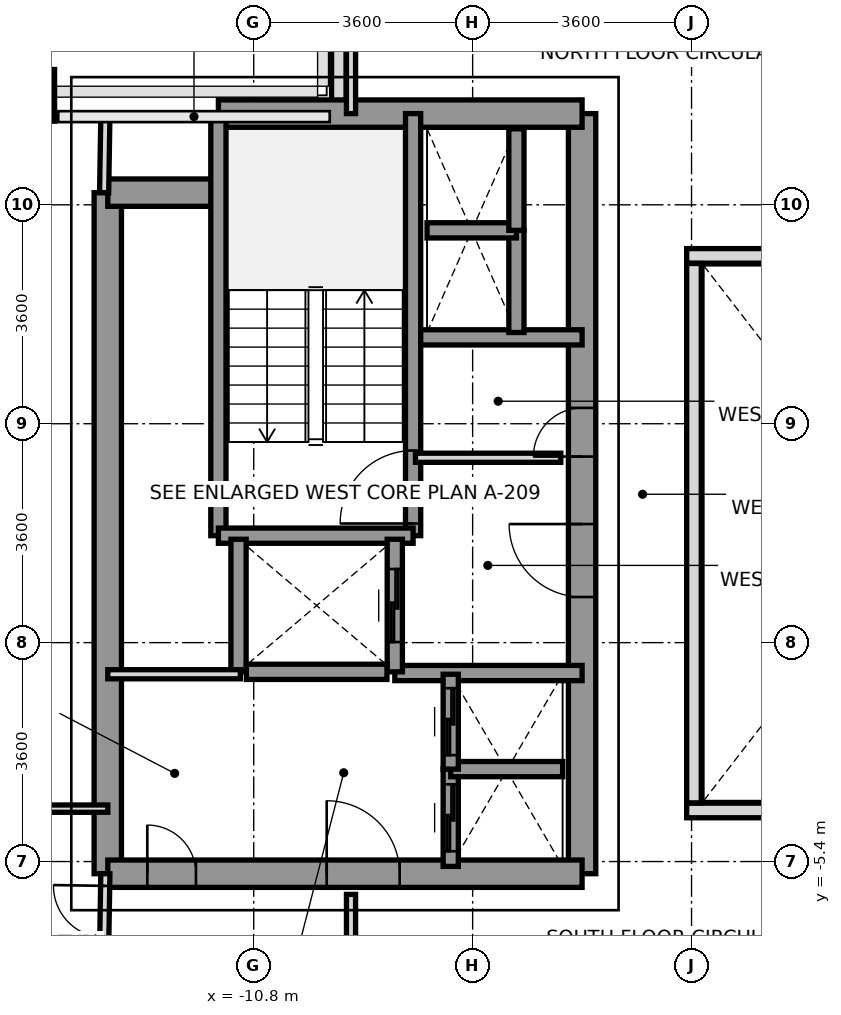
"""IFC4 building model, lengths in metres.
Left out: names, types, materials, properties, quantities, classifications, styles, units other than length and angle.
Written with IfcOpenShell. Run it as: python <this file> out.ifc"""

import sys

from ifc_helpers import new_model, si_unit, direction, frame, frame_2d, origin, origin_2d, place, context, subcontext, project, spatial, rectangle, extrude, source, transform, mapped, element, fill, save


model = new_model("IFC4")
c1 = context("Model", 3, precision=1e-05, world=origin(), true_north=direction((0.0, 1.0)))
c2 = subcontext(c1, "Body", "Model", "MODEL_VIEW")
j1 = project(units=[si_unit("LENGTHUNIT", "METRE"), si_unit("PLANEANGLEUNIT", "RADIAN")], contexts=[c1])
p1 = place(None, origin())
s1 = spatial("IfcSite", under=j1, at=p1, CompositionType="ELEMENT")
p2 = place(p1, origin())
s2 = spatial("IfcBuilding", under=s1, at=p2, CompositionType="ELEMENT")
p3 = place(p2, frame((0.0, 0.0, 100.6)))
s3 = spatial("IfcBuildingStorey", under=s2, at=p3, CompositionType="ELEMENT", Elevation=100.6)
m1 = source(origin(), c2, "Body", "SweptSolid", [
    extrude(rectangle(XDim=0.65, YDim=0.85, at=origin_2d()), origin(), (0.0, 0.0, 1.0), 3.2),
])
p4 = place(p3, frame((-14.4, 7.2, 0.0), z_axis=(0.0, 0.0, 1.0), x_axis=(1.0, 0.0, 0.0)))
e1 = element("IfcColumn", 1, at=p4, inside=s3, PredefinedType="COLUMN", context=c2, shape_type="MappedRepresentation", body=[
    mapped(m1, transform((0.0, 0.0, 0.0), x_axis=(1.0, 0.0, 0.0), y_axis=(0.0, 1.0, 0.0), z_axis=(0.0, 0.0, 1.0), scale=1.0)),
])
p5 = place(p3, frame((-9.4, 6.953, 0.0), z_axis=(0.0, 0.0, 1.0), x_axis=(0.0, 1.0, 0.0)))
e2 = element("IfcWall", 2, at=p5, inside=s3, PredefinedType="PARAPET", context=c2, shape_type="SweptSolid", body=[
    extrude(rectangle(XDim=1.519, YDim=0.24, at=frame_2d((0.76, 0.0))), origin(), (0.0, 0.0, 1.0), 1.15),
])
p6 = place(p3, frame((-13.2, -5.6, 0.0), z_axis=(0.0, 0.0, 1.0), x_axis=(0.0, 1.0, 0.0)))
e3 = element("IfcWall", 3, at=p6, inside=s3, PredefinedType="SHEAR", context=c2, shape_type="SweptSolid", body=[
    extrude(rectangle(XDim=11.2, YDim=0.45, at=frame_2d((5.6, 0.0))), origin(), (0.0, 0.0, 1.0), 3.2),
])
p7 = place(p3, frame((-5.4, -5.6, 0.0), z_axis=(0.0, 0.0, 1.0), x_axis=(0.0, 1.0, 0.0)))
e4 = element("IfcWall", 4, at=p7, inside=s3, PredefinedType="SHEAR", context=c2, shape_type="SweptSolid", body=[
    extrude(rectangle(XDim=12.5, YDim=0.45, at=frame_2d((6.25, 0.0))), origin(), (0.0, 0.0, 1.0), 3.2),
])
p8 = place(p7, frame((4.55, 0.0, 0.0)))
e5 = element("IfcOpeningElement", 5, at=p8, cuts=e4, PredefinedType="OPENING", context=c2, shape_type="SweptSolid", body=[
    extrude(rectangle(XDim=1.2, YDim=2.2, at=frame_2d((0.6, 1.1))), frame((0.0, 0.235, 0.0), z_axis=(0.0, -1.0, 0.0), x_axis=(1.0, 0.0, 0.0)), (0.0, 0.0, 1.0), 0.47),
])
p9 = place(p7, frame((6.86, 0.0, 0.0)))
e6 = element("IfcOpeningElement", 6, at=p9, cuts=e4, PredefinedType="OPENING", context=c2, shape_type="SweptSolid", body=[
    extrude(rectangle(XDim=0.8, YDim=2.1, at=frame_2d((0.4, 1.05))), frame((0.0, 0.235, 0.0), z_axis=(0.0, -1.0, 0.0), x_axis=(1.0, 0.0, 0.0)), (0.0, 0.0, 1.0), 0.47),
])
p10 = place(p3, frame((-11.381, 6.9, 0.0), z_axis=(0.0, 0.0, 1.0), x_axis=(1.0, 0.0, 0.0)))
e7 = element("IfcWall", 7, at=p10, inside=s3, PredefinedType="SHEAR", context=c2, shape_type="SweptSolid", body=[
    extrude(rectangle(XDim=5.981, YDim=0.45, at=frame_2d((2.991, 0.0))), origin(), (0.0, 0.0, 1.0), 3.2),
])
p11 = place(p3, frame((-13.2, 5.6, 0.0), z_axis=(0.0, 0.0, 1.0), x_axis=(1.0, 0.0, 0.0)))
e8 = element("IfcWall", 8, at=p11, inside=s3, PredefinedType="SHEAR", context=c2, shape_type="SweptSolid", body=[
    extrude(rectangle(XDim=1.819, YDim=0.45, at=frame_2d((0.909, 0.0))), origin(), (0.0, 0.0, 1.0), 3.2),
])
p12 = place(p3, frame((-13.2, -5.6, 0.0), z_axis=(0.0, 0.0, 1.0), x_axis=(1.0, 0.0, 0.0)))
e9 = element("IfcWall", 9, at=p12, inside=s3, PredefinedType="SHEAR", context=c2, shape_type="SweptSolid", body=[
    extrude(rectangle(XDim=7.8, YDim=0.45, at=frame_2d((3.9, 0.0))), origin(), (0.0, 0.0, 1.0), 3.2),
])
p13 = place(p12, frame((3.6, 0.0, 0.0)))
e10 = element("IfcOpeningElement", 10, at=p13, cuts=e9, PredefinedType="OPENING", context=c2, shape_type="SweptSolid", body=[
    extrude(rectangle(XDim=1.2, YDim=2.2, at=frame_2d((0.6, 1.1))), frame((0.0, 0.235, 0.0), z_axis=(0.0, -1.0, 0.0), x_axis=(1.0, 0.0, 0.0)), (0.0, 0.0, 1.0), 0.47),
])
p14 = place(p12, frame((0.65, 0.0, 0.0)))
e11 = element("IfcOpeningElement", 11, at=p14, cuts=e9, PredefinedType="OPENING", context=c2, shape_type="SweptSolid", body=[
    extrude(rectangle(XDim=0.8, YDim=2.1, at=frame_2d((0.4, 1.05))), frame((0.0, 0.235, 0.0), z_axis=(0.0, -1.0, 0.0), x_axis=(1.0, 0.0, 0.0)), (0.0, 0.0, 1.0), 0.47),
])
p15 = place(p3, frame((-8.18, 3.22, 0.0), z_axis=(0.0, 0.0, 1.0), x_axis=(1.0, 0.0, 0.0)))
e12 = element("IfcWall", 12, at=p15, inside=s3, PredefinedType="SOLIDWALL", context=c2, shape_type="SweptSolid", body=[
    extrude(rectangle(XDim=2.78, YDim=0.25, at=frame_2d((1.39, 0.0))), origin(), (0.0, 0.0, 1.0), 3.2),
])
p16 = place(p3, frame((-8.48, -2.3, 0.0), z_axis=(0.0, 0.0, 1.0), x_axis=(1.0, 0.0, 0.0)))
e13 = element("IfcWall", 13, at=p16, inside=s3, PredefinedType="SOLIDWALL", context=c2, shape_type="SweptSolid", body=[
    extrude(rectangle(XDim=3.08, YDim=0.25, at=frame_2d((1.54, 0.0))), origin(), (0.0, 0.0, 1.0), 3.2),
])
p17 = place(p3, frame((-8.179, -0.041, 0.0), z_axis=(0.0, 0.0, 1.0), x_axis=(0.0, 1.0, 0.0)))
e14 = element("IfcWall", 14, at=p17, inside=s3, PredefinedType="SOLIDWALL", context=c2, shape_type="SweptSolid", body=[
    extrude(rectangle(XDim=6.941, YDim=0.25, at=frame_2d((3.47, 0.0))), origin(), (0.0, 0.0, 1.0), 3.2),
])
p18 = place(p17, frame((0.2, 0.0, 0.0)))
e15 = element("IfcOpeningElement", 15, at=p18, cuts=e14, PredefinedType="OPENING", context=c2, shape_type="SweptSolid", body=[
    extrude(rectangle(XDim=1.2, YDim=2.2, at=frame_2d((0.6, 1.1))), frame((0.0, 0.135, 0.0), z_axis=(0.0, -1.0, 0.0), x_axis=(1.0, 0.0, 0.0)), (0.0, 0.0, 1.0), 0.27),
])
p19 = place(p3, frame((-11.381, -0.041, 0.0), z_axis=(0.0, 0.0, 1.0), x_axis=(0.0, 1.0, 0.0)))
e16 = element("IfcWall", 16, at=p19, inside=s3, PredefinedType="SOLIDWALL", context=c2, shape_type="SweptSolid", body=[
    extrude(rectangle(XDim=6.941, YDim=0.25, at=frame_2d((3.47, 0.0))), origin(), (0.0, 0.0, 1.0), 3.2),
])
p20 = place(p3, frame((-11.381, -0.041, 0.0), z_axis=(0.0, 0.0, 1.0), x_axis=(1.0, 0.0, 0.0)))
e17 = element("IfcWall", 17, at=p20, inside=s3, PredefinedType="SOLIDWALL", context=c2, shape_type="SweptSolid", body=[
    extrude(rectangle(XDim=3.202, YDim=0.25, at=frame_2d((1.601, 0.0))), origin(), (0.0, 0.0, 1.0), 3.2),
])
p21 = place(p3, frame((-11.05, -2.28, 0.0), z_axis=(0.0, 0.0, 1.0), x_axis=(0.0, 1.0, 0.0)))
e18 = element("IfcWall", 18, at=p21, inside=s3, PredefinedType="SOLIDWALL", context=c2, shape_type="SweptSolid", body=[
    extrude(rectangle(XDim=2.18, YDim=0.25, at=frame_2d((1.09, 0.0))), origin(), (0.0, 0.0, 1.0), 3.2),
])
p22 = place(p3, frame((-8.48, -2.28, 0.0), z_axis=(0.0, 0.0, 1.0), x_axis=(0.0, 1.0, 0.0)))
e19 = element("IfcWall", 19, at=p22, inside=s3, PredefinedType="SOLIDWALL", context=c2, shape_type="SweptSolid", body=[
    extrude(rectangle(XDim=2.18, YDim=0.25, at=frame_2d((1.09, 0.0))), origin(), (0.0, 0.0, 1.0), 3.2),
])
p23 = place(p22, frame((0.49, 0.0, 0.0)))
e20 = element("IfcOpeningElement", 20, at=p23, cuts=e19, PredefinedType="OPENING", context=c2, shape_type="SweptSolid", body=[
    extrude(rectangle(XDim=1.2, YDim=2.2, at=frame_2d((0.6, 1.1))), frame((0.0, 0.135, 0.0), z_axis=(0.0, -1.0, 0.0), x_axis=(1.0, 0.0, 0.0)), (0.0, 0.0, 1.0), 0.27),
])
p24 = place(p3, frame((-10.921, -2.28, 0.0), z_axis=(0.0, 0.0, 1.0), x_axis=(1.0, 0.0, 0.0)))
e21 = element("IfcWall", 21, at=p24, inside=s3, PredefinedType="SOLIDWALL", context=c2, shape_type="SweptSolid", body=[
    extrude(rectangle(XDim=2.312, YDim=0.25, at=frame_2d((1.156, 0.0))), origin(), (0.0, 0.0, 1.0), 3.2),
])
p25 = place(p3, frame((-7.56, -5.48, 0.0), z_axis=(0.0, 0.0, 1.0), x_axis=(0.0, 1.0, 0.0)))
e22 = element("IfcWall", 22, at=p25, inside=s3, PredefinedType="SOLIDWALL", context=c2, shape_type="SweptSolid", body=[
    extrude(rectangle(XDim=1.6, YDim=0.25, at=frame_2d((0.8, 0.0))), origin(), (0.0, 0.0, 1.0), 3.2),
])
p26 = place(p25, frame((0.25, 0.0, 0.0)))
e23 = element("IfcOpeningElement", 23, at=p26, cuts=e22, PredefinedType="OPENING", context=c2, shape_type="SweptSolid", body=[
    extrude(rectangle(XDim=1.1, YDim=2.2, at=frame_2d((0.55, 1.1))), frame((0.0, 0.135, 0.0), z_axis=(0.0, -1.0, 0.0), x_axis=(1.0, 0.0, 0.0)), (0.0, 0.0, 1.0), 0.27),
])
p27 = place(p3, frame((-7.56, -3.88, 0.0), z_axis=(0.0, 0.0, 1.0), x_axis=(1.0, 0.0, 0.0)))
e24 = element("IfcWall", 24, at=p27, inside=s3, PredefinedType="SOLIDWALL", context=c2, shape_type="SweptSolid", body=[
    extrude(rectangle(XDim=1.84, YDim=0.25, at=frame_2d((0.92, 0.0))), origin(), (0.0, 0.0, 1.0), 3.2),
])
p28 = place(p3, frame((-7.56, -3.88, 0.0), z_axis=(0.0, 0.0, 1.0), x_axis=(0.0, 1.0, 0.0)))
e25 = element("IfcWall", 25, at=p28, inside=s3, PredefinedType="SOLIDWALL", context=c2, shape_type="SweptSolid", body=[
    extrude(rectangle(XDim=1.56, YDim=0.25, at=frame_2d((0.78, 0.0))), origin(), (0.0, 0.0, 1.0), 3.2),
])
p29 = place(p28, frame((0.23, 0.0, 0.0)))
e26 = element("IfcOpeningElement", 26, at=p29, cuts=e25, PredefinedType="OPENING", context=c2, shape_type="SweptSolid", body=[
    extrude(rectangle(XDim=1.1, YDim=2.2, at=frame_2d((0.55, 1.1))), frame((0.0, 0.135, 0.0), z_axis=(0.0, -1.0, 0.0), x_axis=(1.0, 0.0, 0.0)), (0.0, 0.0, 1.0), 0.27),
])
p30 = place(p3, frame((-6.48, 3.3, 0.0), z_axis=(0.0, 0.0, 1.0), x_axis=(0.0, 1.0, 0.0)))
e27 = element("IfcWall", 27, at=p30, inside=s3, PredefinedType="SOLIDWALL", context=c2, shape_type="SweptSolid", body=[
    extrude(rectangle(XDim=1.68, YDim=0.25, at=frame_2d((0.84, 0.0))), origin(), (0.0, 0.0, 1.0), 3.2),
])
p31 = place(p3, frame((-7.95, 4.98, 0.0), z_axis=(0.0, 0.0, 1.0), x_axis=(1.0, 0.0, 0.0)))
e28 = element("IfcWall", 28, at=p31, inside=s3, PredefinedType="SOLIDWALL", context=c2, shape_type="SweptSolid", body=[
    extrude(rectangle(XDim=1.47, YDim=0.25, at=frame_2d((0.735, 0.0))), origin(), (0.0, 0.0, 1.0), 3.2),
])
p32 = place(p3, frame((-6.48, 4.98, 0.0), z_axis=(0.0, 0.0, 1.0), x_axis=(0.0, 1.0, 0.0)))
e29 = element("IfcWall", 29, at=p32, inside=s3, PredefinedType="SOLIDWALL", context=c2, shape_type="SweptSolid", body=[
    extrude(rectangle(XDim=1.67, YDim=0.25, at=frame_2d((0.835, 0.0))), origin(), (0.0, 0.0, 1.0), 3.2),
])
p33 = place(p3, frame((-8.14, 1.24, 0.0), z_axis=(0.0, 0.0, 1.0), x_axis=(1.0, 0.0, 0.0)))
e30 = element("IfcWall", 30, at=p33, inside=s3, PredefinedType="PARTITIONING", context=c2, shape_type="SweptSolid", body=[
    extrude(rectangle(XDim=2.39, YDim=0.15, at=frame_2d((1.195, 0.0))), origin(), (0.0, 0.0, 1.0), 2.3),
])
p34 = place(p3, frame((-13.2, -2.32, 0.0), z_axis=(0.0, 0.0, 1.0), x_axis=(1.0, 0.0, 0.0)))
e31 = element("IfcWall", 31, at=p34, inside=s3, PredefinedType="PARTITIONING", context=c2, shape_type="SweptSolid", body=[
    extrude(rectangle(XDim=2.18, YDim=0.15, at=frame_2d((1.09, 0.0))), origin(), (0.0, 0.0, 1.0), 3.2),
])
p35 = place(p3, frame((-9.2, 6.9, 0.0), z_axis=(0.0, 0.0, 1.0), x_axis=(0.0, 1.0, 0.0)))
e32 = element("IfcWall", 32, at=p35, inside=s3, PredefinedType="PARTITIONING", context=c2, shape_type="SweptSolid", body=[
    extrude(rectangle(XDim=8.78, YDim=0.15, at=frame_2d((4.39, 0.0))), origin(), (0.0, 0.0, 1.0), 2.7),
])
p36 = place(p3, frame((-9.2, -15.68, 0.0), z_axis=(0.0, 0.0, 1.0), x_axis=(0.0, 1.0, 0.0)))
e33 = element("IfcWall", 33, at=p36, inside=s3, PredefinedType="PARTITIONING", context=c2, shape_type="SweptSolid", body=[
    extrude(rectangle(XDim=9.74, YDim=0.15, at=frame_2d((4.87, 0.0))), origin(), (0.0, 0.0, 1.0), 2.7),
])
p37 = place(p3, frame((-13.26, 5.6, 0.0), z_axis=(0.0, 0.0, 1.0), x_axis=(0.016013571389, 0.999871774545, 0.0)))
e34 = element("IfcWall", 34, at=p37, inside=s3, PredefinedType="PARTITIONING", context=c2, shape_type="SweptSolid", body=[
    extrude(rectangle(XDim=1.25, YDim=0.15, at=frame_2d((0.625, 0.0))), origin(), (0.0, 0.0, 1.0), 3.2),
])
p38 = place(p3, frame((-13.26, -6.85, 0.0), z_axis=(0.0, 0.0, 1.0), x_axis=(0.016013571389, 0.999871774545, 0.0)))
e35 = element("IfcWall", 35, at=p38, inside=s3, PredefinedType="PARTITIONING", context=c2, shape_type="SweptSolid", body=[
    extrude(rectangle(XDim=1.25, YDim=0.15, at=frame_2d((0.625, 0.0))), origin(), (0.0, 0.0, 1.0), 3.2),
])
p39 = place(p38, frame((0.2, 0.0, 0.0)))
e36 = element("IfcOpeningElement", 36, at=p39, cuts=e35, PredefinedType="OPENING", context=c2, shape_type="SweptSolid", body=[
    extrude(rectangle(XDim=0.85, YDim=2.1, at=frame_2d((0.425, 1.05))), frame((0.0, 0.085, 0.0), z_axis=(0.0, -1.0, 0.0), x_axis=(1.0, 0.0, 0.0)), (0.0, 0.0, 1.0), 0.17),
])
p40 = place(p3, frame((-23.3, -4.53, 0.0), z_axis=(0.0, 0.0, 1.0), x_axis=(1.0, 0.0, 0.0)))
e37 = element("IfcWall", 37, at=p40, inside=s3, PredefinedType="PARTITIONING", context=c2, shape_type="SweptSolid", body=[
    extrude(rectangle(XDim=10.1, YDim=0.12, at=frame_2d((5.05, 0.0))), origin(), (0.0, 0.0, 1.0), 2.75),
])
p41 = place(p40, frame((2.1, 0.0, 0.0)))
e38 = element("IfcOpeningElement", 38, at=p41, cuts=e37, PredefinedType="OPENING", context=c2, shape_type="SweptSolid", body=[
    extrude(rectangle(XDim=0.95, YDim=2.15, at=frame_2d((0.475, 1.075))), frame((0.0, 0.07, 0.0), z_axis=(0.0, -1.0, 0.0), x_axis=(1.0, 0.0, 0.0)), (0.0, 0.0, 1.0), 0.14),
])
for number, where, z_axis, x_axis in (
    (39, (-3.68, -4.56, 0.0), (0.0, 0.0, 1.0), (1.0, 0.0, 0.0)),
    (40, (-3.68, 4.56, 0.0), (0.0, 0.0, 1.0), (1.0, 0.0, 0.0)),
):
    element("IfcWall", number, at=place(p3, frame(where, z_axis=z_axis, x_axis=x_axis)), inside=s3, PredefinedType="PARAPET", context=c2, shape_type="SweptSolid", body=[
        extrude(rectangle(XDim=7.36, YDim=0.24, at=frame_2d((3.68, 0.0))), origin(), (0.0, 0.0, 1.0), 1.15),
    ])
p42 = place(p3, frame((-3.56, -4.435, 0.0), z_axis=(0.0, 0.0, 1.0), x_axis=(0.0, 1.0, 0.0)))
e41 = element("IfcWall", 41, at=p42, inside=s3, PredefinedType="PARAPET", context=c2, shape_type="SweptSolid", body=[
    extrude(rectangle(XDim=8.87, YDim=0.24, at=frame_2d((4.435, 0.0))), origin(), (0.0, 0.0, 1.0), 1.15),
])
m2 = source(origin(), c2, "Body", "SweptSolid", [
    extrude(rectangle(XDim=1.2, YDim=2.2, at=frame_2d((0.6, 1.1))), frame((0.0, 0.025, 0.0), z_axis=(0.0, -1.0, 0.0), x_axis=(1.0, 0.0, 0.0)), (0.0, 0.0, 1.0), 0.05),
])
p43 = place(p18, origin())
e42 = element("IfcDoor", 42, at=p43, inside=s3, OperationType="SINGLE_SWING_LEFT", PredefinedType="DOOR", context=c2, shape_type="MappedRepresentation", body=[
    mapped(m2, transform((0.0, 0.0, 0.0), x_axis=(1.0, 0.0, 0.0), y_axis=(0.0, 1.0, 0.0), z_axis=(0.0, 0.0, 1.0), scale=1.0)),
])
fill(e15, e42)
p44 = place(p8, origin())
e43 = element("IfcDoor", 43, at=p44, inside=s3, OperationType="SINGLE_SWING_RIGHT", PredefinedType="DOOR", context=c2, shape_type="MappedRepresentation", body=[
    mapped(m2, transform((0.0, 0.0, 0.0), x_axis=(1.0, 0.0, 0.0), y_axis=(0.0, 1.0, 0.0), z_axis=(0.0, 0.0, 1.0), scale=1.0)),
])
fill(e5, e43)
p45 = place(p13, origin())
e44 = element("IfcDoor", 44, at=p45, inside=s3, OperationType="SINGLE_SWING_LEFT", PredefinedType="DOOR", context=c2, shape_type="MappedRepresentation", body=[
    mapped(m2, transform((0.0, 0.0, 0.0), x_axis=(1.0, 0.0, 0.0), y_axis=(0.0, 1.0, 0.0), z_axis=(0.0, 0.0, 1.0), scale=1.0)),
])
fill(e10, e44)
m3 = source(origin(), c2, "Body", "SweptSolid", [
    extrude(rectangle(XDim=0.8, YDim=2.1, at=frame_2d((0.4, 1.05))), frame((0.0, 0.025, 0.0), z_axis=(0.0, -1.0, 0.0), x_axis=(1.0, 0.0, 0.0)), (0.0, 0.0, 1.0), 0.05),
])
p46 = place(p9, origin())
e45 = element("IfcDoor", 45, at=p46, inside=s3, OperationType="SINGLE_SWING_LEFT", PredefinedType="DOOR", context=c2, shape_type="MappedRepresentation", body=[
    mapped(m3, transform((0.0, 0.0, 0.0), x_axis=(1.0, 0.0, 0.0), y_axis=(0.0, 1.0, 0.0), z_axis=(0.0, 0.0, 1.0), scale=1.0)),
])
fill(e6, e45)
p47 = place(p14, origin())
e46 = element("IfcDoor", 46, at=p47, inside=s3, OperationType="SINGLE_SWING_LEFT", PredefinedType="DOOR", context=c2, shape_type="MappedRepresentation", body=[
    mapped(m3, transform((0.0, 0.0, 0.0), x_axis=(1.0, 0.0, 0.0), y_axis=(0.0, 1.0, 0.0), z_axis=(0.0, 0.0, 1.0), scale=1.0)),
])
fill(e11, e46)
p48 = place(p23, origin())
e47 = element("IfcDoor", 47, at=p48, inside=s3, OperationType="SLIDING_TO_RIGHT", PredefinedType="DOOR", context=c2, shape_type="MappedRepresentation", body=[
    mapped(m2, transform((0.0, 0.0, 0.0), x_axis=(1.0, 0.0, 0.0), y_axis=(0.0, 1.0, 0.0), z_axis=(0.0, 0.0, 1.0), scale=1.0)),
])
fill(e20, e47)
m4 = source(origin(), c2, "Body", "SweptSolid", [
    extrude(rectangle(XDim=1.1, YDim=2.2, at=frame_2d((0.55, 1.1))), frame((0.0, 0.025, 0.0), z_axis=(0.0, -1.0, 0.0), x_axis=(1.0, 0.0, 0.0)), (0.0, 0.0, 1.0), 0.05),
])
p49 = place(p26, origin())
e48 = element("IfcDoor", 48, at=p49, inside=s3, OperationType="SLIDING_TO_LEFT", PredefinedType="DOOR", context=c2, shape_type="MappedRepresentation", body=[
    mapped(m4, transform((0.0, 0.0, 0.0), x_axis=(1.0, 0.0, 0.0), y_axis=(0.0, 1.0, 0.0), z_axis=(0.0, 0.0, 1.0), scale=1.0)),
])
fill(e23, e48)
p50 = place(p29, origin())
e49 = element("IfcDoor", 49, at=p50, inside=s3, OperationType="SLIDING_TO_LEFT", PredefinedType="DOOR", context=c2, shape_type="MappedRepresentation", body=[
    mapped(m4, transform((0.0, 0.0, 0.0), x_axis=(1.0, 0.0, 0.0), y_axis=(0.0, 1.0, 0.0), z_axis=(0.0, 0.0, 1.0), scale=1.0)),
])
fill(e26, e49)
m5 = source(origin(), c2, "Body", "SweptSolid", [
    extrude(rectangle(XDim=0.85, YDim=2.1, at=frame_2d((0.425, 1.05))), frame((0.0, 0.025, 0.0), z_axis=(0.0, -1.0, 0.0), x_axis=(1.0, 0.0, 0.0)), (0.0, 0.0, 1.0), 0.05),
])
p51 = place(p39, origin())
e50 = element("IfcDoor", 50, at=p51, inside=s3, OperationType="SINGLE_SWING_RIGHT", PredefinedType="DOOR", context=c2, shape_type="MappedRepresentation", body=[
    mapped(m5, transform((0.0, 0.0, 0.0), x_axis=(1.0, 0.0, 0.0), y_axis=(0.0, 1.0, 0.0), z_axis=(0.0, 0.0, 1.0), scale=1.0)),
])
fill(e36, e50)
save(model, sys.argv[1])
